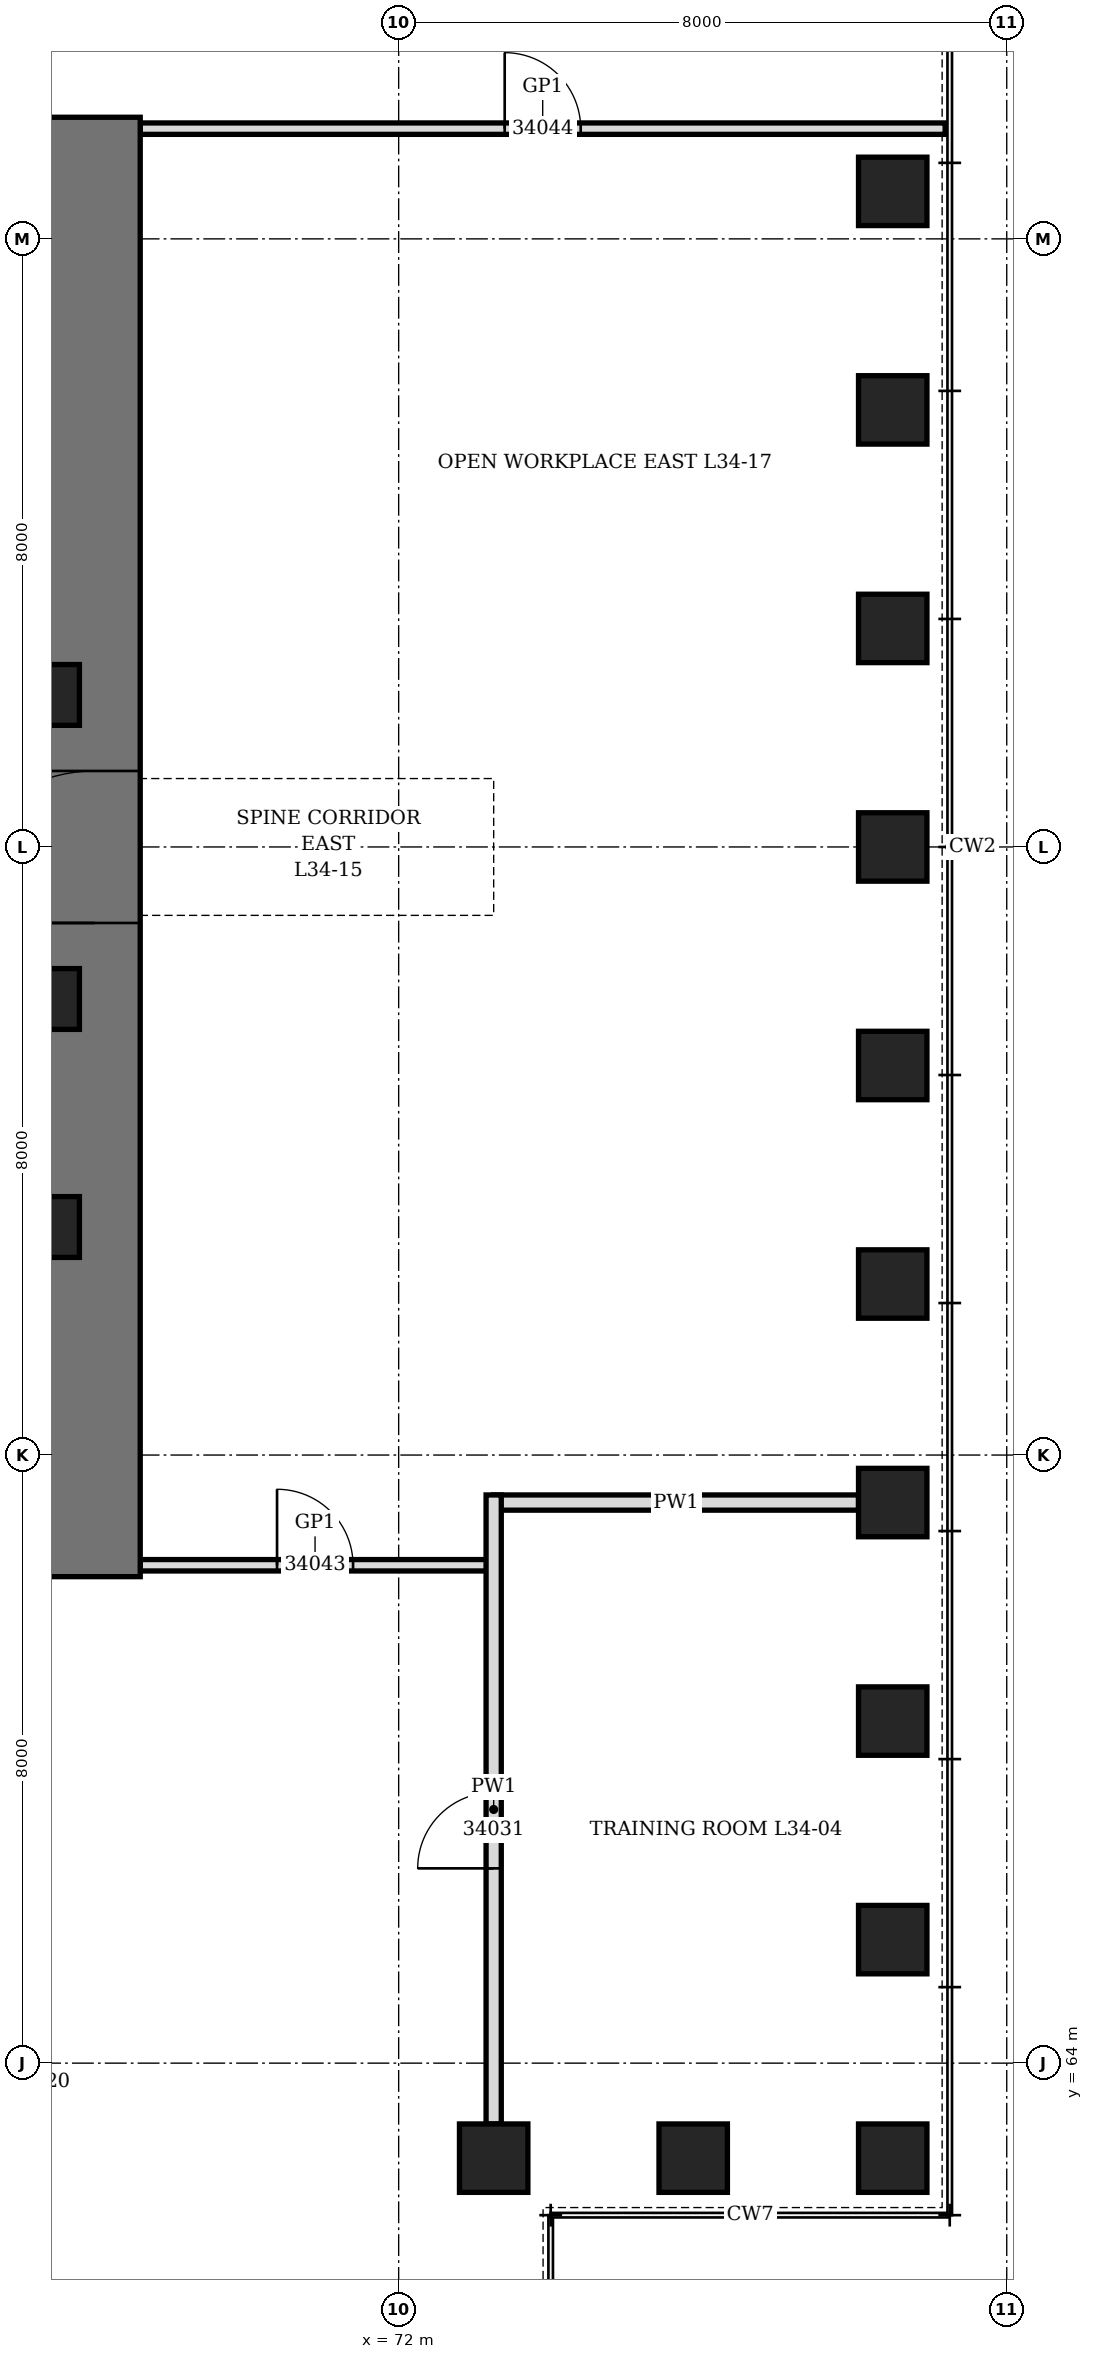
"""IFC4 building model, lengths in metres.
Left out: names, types, materials, properties, quantities, classifications, styles, units other than length and angle.
Written with IfcOpenShell. Run it as: python <this file> out.ifc"""

import sys

from ifc_helpers import new_model, si_unit, direction, frame, frame_2d, origin, origin_2d, place, context, subcontext, project, spatial, rectangle, hollow_rectangle, extrude, element, fill, save


model = new_model("IFC4")
c1 = context("Model", 3, precision=1e-05, world=origin(), true_north=direction((0.0, 1.0)))
c2 = subcontext(c1, "Body", "Model", "MODEL_VIEW")
j1 = project(units=[si_unit("LENGTHUNIT", "METRE"), si_unit("PLANEANGLEUNIT", "RADIAN")], contexts=[c1])
p1 = place(None, origin())
s1 = spatial("IfcSite", under=j1, at=p1, CompositionType="ELEMENT")
p2 = place(p1, origin())
s2 = spatial("IfcBuilding", under=s1, at=p2, CompositionType="ELEMENT")
p3 = place(p2, frame((0.0, 0.0, 154.3)))
s3 = spatial("IfcBuildingStorey", under=s2, at=p3, CompositionType="ELEMENT", Elevation=154.3)
for number, where, z_axis, x_axis in (
    (1, (73.25, 62.75, 0.0), (0.0, 0.0, 1.0), (1.0, 0.0, 0.0)),
    (2, (75.875, 62.75, 0.0), (0.0, 0.0, 1.0), (1.0, 0.0, 0.0)),
    (3, (78.5, 62.75, 0.0), (0.0, 0.0, 1.0), (0.0, 1.0, 0.0)),
    (4, (78.5, 65.625, 0.0), (0.0, 0.0, 1.0), (0.0, 1.0, 0.0)),
    (5, (78.5, 68.5, 0.0), (0.0, 0.0, 1.0), (0.0, 1.0, 0.0)),
    (6, (78.5, 71.375, 0.0), (0.0, 0.0, 1.0), (0.0, 1.0, 0.0)),
    (7, (78.5, 74.25, 0.0), (0.0, 0.0, 1.0), (0.0, 1.0, 0.0)),
    (8, (78.5, 77.125, 0.0), (0.0, 0.0, 1.0), (0.0, 1.0, 0.0)),
    (9, (78.5, 80.0, 0.0), (0.0, 0.0, 1.0), (0.0, 1.0, 0.0)),
    (10, (78.5, 82.875, 0.0), (0.0, 0.0, 1.0), (0.0, 1.0, 0.0)),
    (11, (78.5, 85.75, 0.0), (0.0, 0.0, 1.0), (0.0, 1.0, 0.0)),
    (12, (78.5, 88.625, 0.0), (0.0, 0.0, 1.0), (0.0, 1.0, 0.0)),
):
    element("IfcColumn", number, at=place(p3, frame(where, z_axis=z_axis, x_axis=x_axis)), inside=s3, PredefinedType="COLUMN", context=c2, shape_type="SweptSolid", body=[
        extrude(hollow_rectangle(XDim=0.9, YDim=0.9, WallThickness=0.12, at=origin_2d()), origin(), (0.0, 0.0, 1.0), 4.2),
    ])
p4 = place(p3, frame((68.0, 70.4, 0.0), z_axis=(0.0, 0.0, 1.0), x_axis=(0.0, 1.0, 0.0)))
e13 = element("IfcWall", 13, at=p4, inside=s3, PredefinedType="SHEAR", context=c2, shape_type="SweptSolid", body=[
    extrude(rectangle(XDim=19.2, YDim=1.2, at=frame_2d((9.6, 0.0))), origin(), (0.0, 0.0, 1.0), 4.2),
])
p5 = place(p4, frame((8.6, 0.0, 0.0)))
e14 = element("IfcOpeningElement", 14, at=p5, cuts=e13, PredefinedType="OPENING", context=c2, shape_type="SweptSolid", body=[
    extrude(rectangle(XDim=2.0, YDim=2.4, at=frame_2d((1.0, 1.2))), frame((0.0, 0.61, 0.0), z_axis=(0.0, -1.0, 0.0), x_axis=(1.0, 0.0, 0.0)), (0.0, 0.0, 1.0), 1.22),
])
for number, where, z_axis, x_axis in (
    (15, (67.4, 75.0, 0.0), (0.0, 0.0, 1.0), (1.0, 0.0, 0.0)),
    (16, (67.4, 78.0, 0.0), (0.0, 0.0, 1.0), (1.0, 0.0, 0.0)),
    (17, (67.4, 82.0, 0.0), (0.0, 0.0, 1.0), (1.0, 0.0, 0.0)),
):
    element("IfcColumn", number, at=place(p3, frame(where, z_axis=z_axis, x_axis=x_axis)), inside=s3, PredefinedType="COLUMN", context=c2, shape_type="SweptSolid", body=[
        extrude(hollow_rectangle(XDim=0.8, YDim=0.8, WallThickness=0.1, at=origin_2d()), origin(), (0.0, 0.0, 1.0), 4.2),
    ])
p6 = place(p3, frame((73.25, 71.375, 0.0), z_axis=(0.0, 0.0, 1.0), x_axis=(1.0, 0.0, 0.0)))
e18 = element("IfcWall", 18, at=p6, inside=s3, PredefinedType="PARTITIONING", context=c2, shape_type="SweptSolid", body=[
    extrude(rectangle(XDim=4.8, YDim=0.2, at=frame_2d((2.4, 0.0))), origin(), (0.0, 0.0, 1.0), 3.428),
])
p7 = place(p3, frame((68.6, 70.55, 0.0), z_axis=(0.0, 0.0, 1.0), x_axis=(1.0, 0.0, 0.0)))
e19 = element("IfcWall", 19, at=p7, inside=s3, PredefinedType="PARTITIONING", context=c2, shape_type="SweptSolid", body=[
    extrude(rectangle(XDim=4.6, YDim=0.15, at=frame_2d((2.3, 0.0))), origin(), (0.0, 0.0, 1.0), 4.04),
])
p8 = place(p7, frame((1.8, 0.0, 0.0)))
e20 = element("IfcOpeningElement", 20, at=p8, cuts=e19, PredefinedType="OPENING", context=c2, shape_type="SweptSolid", body=[
    extrude(rectangle(XDim=1.0, YDim=2.4, at=frame_2d((0.5, 1.2))), frame((0.0, 0.085, 0.0), z_axis=(0.0, -1.0, 0.0), x_axis=(1.0, 0.0, 0.0)), (0.0, 0.0, 1.0), 0.17),
])
p9 = place(p3, frame((68.6, 89.45, 0.0), z_axis=(0.0, 0.0, 1.0), x_axis=(1.0, 0.0, 0.0)))
e21 = element("IfcWall", 21, at=p9, inside=s3, PredefinedType="PARTITIONING", context=c2, shape_type="SweptSolid", body=[
    extrude(rectangle(XDim=10.59, YDim=0.15, at=frame_2d((5.295, 0.0))), origin(), (0.0, 0.0, 1.0), 4.04),
])
p10 = place(p9, frame((4.795, 0.0, 0.0)))
e22 = element("IfcOpeningElement", 22, at=p10, cuts=e21, PredefinedType="OPENING", context=c2, shape_type="SweptSolid", body=[
    extrude(rectangle(XDim=1.0, YDim=2.4, at=frame_2d((0.5, 1.2))), frame((0.0, 0.085, 0.0), z_axis=(0.0, -1.0, 0.0), x_axis=(1.0, 0.0, 0.0)), (0.0, 0.0, 1.0), 0.17),
])
p11 = place(p3, frame((73.25, 63.2, 0.0), z_axis=(0.0, 0.0, 1.0), x_axis=(0.0, 1.0, 0.0)))
e23 = element("IfcWall", 23, at=p11, inside=s3, PredefinedType="PARTITIONING", context=c2, shape_type="SweptSolid", body=[
    extrude(rectangle(XDim=8.275, YDim=0.2, at=frame_2d((4.138, 0.0))), origin(), (0.0, 0.0, 1.0), 4.04),
])
p12 = place(p11, frame((3.363, 0.0, 0.0)))
e24 = element("IfcOpeningElement", 24, at=p12, cuts=e23, PredefinedType="OPENING", context=c2, shape_type="SweptSolid", body=[
    extrude(rectangle(XDim=1.0, YDim=2.1, at=frame_2d((0.5, 1.05))), frame((0.0, 0.11, 0.0), z_axis=(0.0, -1.0, 0.0), x_axis=(1.0, 0.0, 0.0)), (0.0, 0.0, 1.0), 0.22),
])
p13 = place(p5, origin())
e25 = element("IfcDoor", 25, at=p13, inside=s3, OperationType="DOUBLE_DOOR_SINGLE_SWING", PredefinedType="DOOR", context=c2, shape_type="SweptSolid", body=[
    extrude(rectangle(XDim=2.0, YDim=2.4, at=frame_2d((1.0, 1.2))), frame((0.0, 0.35, 0.0), z_axis=(0.0, -1.0, 0.0), x_axis=(1.0, 0.0, 0.0)), (0.0, 0.0, 1.0), 0.7),
])
fill(e14, e25)
p14 = place(p12, origin())
e26 = element("IfcDoor", 26, at=p14, inside=s3, OperationType="SINGLE_SWING_LEFT", PredefinedType="DOOR", context=c2, shape_type="SweptSolid", body=[
    extrude(rectangle(XDim=1.0, YDim=2.1, at=frame_2d((0.5, 1.05))), frame((0.0, 0.1, 0.0), z_axis=(0.0, -1.0, 0.0), x_axis=(1.0, 0.0, 0.0)), (0.0, 0.0, 1.0), 0.199),
])
fill(e24, e26)
p15 = place(p8, origin())
e27 = element("IfcDoor", 27, at=p15, inside=s3, OperationType="SINGLE_SWING_RIGHT", PredefinedType="DOOR", context=c2, shape_type="SweptSolid", body=[
    extrude(rectangle(XDim=1.0, YDim=2.4, at=frame_2d((0.5, 1.2))), frame((0.0, 0.075, 0.0), z_axis=(0.0, -1.0, 0.0), x_axis=(1.0, 0.0, 0.0)), (0.0, 0.0, 1.0), 0.149),
])
fill(e20, e27)
p16 = place(p10, origin())
e28 = element("IfcDoor", 28, at=p16, inside=s3, OperationType="SINGLE_SWING_RIGHT", PredefinedType="DOOR", context=c2, shape_type="SweptSolid", body=[
    extrude(rectangle(XDim=1.0, YDim=2.4, at=frame_2d((0.5, 1.2))), frame((0.0, 0.075, 0.0), z_axis=(0.0, -1.0, 0.0), x_axis=(1.0, 0.0, 0.0)), (0.0, 0.0, 1.0), 0.149),
])
fill(e22, e28)
save(model, sys.argv[1])
